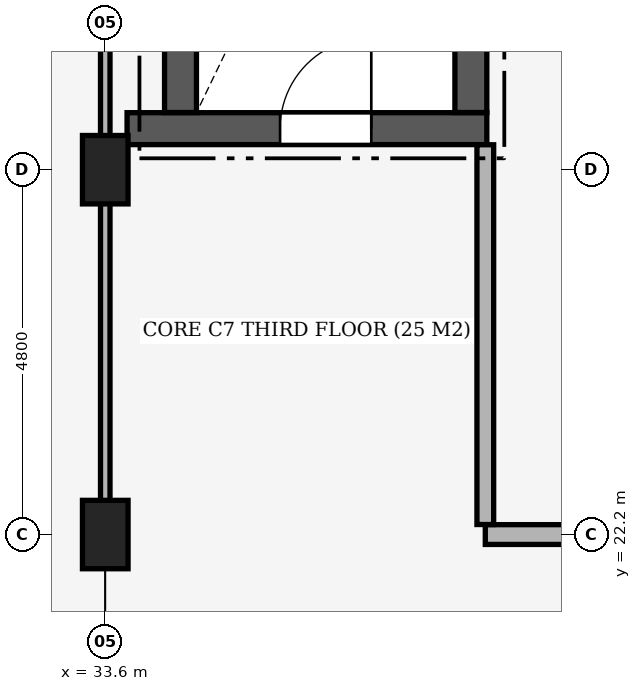
"""IFC4 building model, lengths in metres.
Left out: names, types, materials, properties, quantities, classifications, styles, units other than length and angle.
Written with IfcOpenShell. Run it as: python <this file> out.ifc"""

import sys

from ifc_helpers import new_model, si_unit, direction, frame, frame_2d, origin, origin_2d, place, context, subcontext, project, spatial, rectangle, extrude, element, fill, save


model = new_model("IFC4")
c1 = context("Model", 3, precision=1e-05, world=origin(), true_north=direction((0.0, 1.0)))
c2 = subcontext(c1, "Body", "Model", "MODEL_VIEW")
j1 = project(units=[si_unit("LENGTHUNIT", "METRE"), si_unit("PLANEANGLEUNIT", "RADIAN")], contexts=[c1])
p1 = place(None, origin())
s1 = spatial("IfcSite", under=j1, at=p1, CompositionType="ELEMENT")
p2 = place(p1, origin())
s2 = spatial("IfcBuilding", under=s1, at=p2, CompositionType="ELEMENT")
p3 = place(p2, frame((0.0, 0.0, 15.3)))
s3 = spatial("IfcBuildingStorey", under=s2, at=p3, CompositionType="ELEMENT", Elevation=15.3)
for number, where, z_axis, x_axis in (
    (1, (33.6, 22.2, 0.0), (0.0, 0.0, 1.0), (1.0, 0.0, 0.0)),
    (2, (33.6, 27.0, 0.0), (0.0, 0.0, 1.0), (1.0, 0.0, 0.0)),
):
    element("IfcColumn", number, at=place(p3, frame(where, z_axis=z_axis, x_axis=x_axis)), inside=s3, PredefinedType="COLUMN", context=c2, shape_type="SweptSolid", body=[
        extrude(rectangle(XDim=0.6, YDim=0.9, at=origin_2d()), origin(), (0.0, 0.0, 1.0), 5.1),
    ])
p4 = place(p3, frame((33.887, 27.54, 0.0), z_axis=(0.0, 0.0, 1.0), x_axis=(1.0, 0.0, 0.0)))
e3 = element("IfcWall", 3, at=p4, inside=s3, PredefinedType="SHEAR", context=c2, shape_type="SweptSolid", body=[
    extrude(rectangle(XDim=4.733, YDim=0.42, at=frame_2d((2.367, 0.0))), origin(), (0.0, 0.0, 1.0), 4.84),
])
p5 = place(p4, frame((2.013, 0.0, 0.0)))
e4 = element("IfcOpeningElement", 4, at=p5, cuts=e3, PredefinedType="OPENING", context=c2, shape_type="SweptSolid", body=[
    extrude(rectangle(XDim=1.2, YDim=2.2, at=frame_2d((0.6, 1.1))), frame((0.0, 0.225, 0.0), z_axis=(0.0, -1.0, 0.0), x_axis=(1.0, 0.0, 0.0)), (0.0, 0.0, 1.0), 0.45),
])
for number, where, z_axis, x_axis in (
    (5, (34.59, 27.752, 0.0), (0.0, 0.0, 1.0), (0.0, 1.0, 0.0)),
    (6, (38.41, 27.752, 0.0), (0.0, 0.0, 1.0), (0.0, 1.0, 0.0)),
):
    element("IfcWall", number, at=place(p3, frame(where, z_axis=z_axis, x_axis=x_axis)), inside=s3, PredefinedType="SHEAR", context=c2, shape_type="SweptSolid", body=[
        extrude(rectangle(XDim=7.046, YDim=0.42, at=frame_2d((3.523, 0.0))), origin(), (0.0, 0.0, 1.0), 4.84),
    ])
p6 = place(p3, frame((38.6, 22.2, 0.0), z_axis=(0.0, 0.0, 1.0), x_axis=(1.0, 0.0, 0.0)))
e7 = element("IfcWall", 7, at=p6, inside=s3, PredefinedType="PARTITIONING", context=c2, shape_type="SweptSolid", body=[
    extrude(rectangle(XDim=20.7, YDim=0.26, at=frame_2d((10.35, 0.0))), origin(), (0.0, 0.0, 1.0), 4.14),
])
p7 = place(p6, frame((9.325, 0.0, 0.0)))
e8 = element("IfcOpeningElement", 8, at=p7, cuts=e7, PredefinedType="OPENING", context=c2, shape_type="SweptSolid", body=[
    extrude(rectangle(XDim=1.15, YDim=2.15, at=frame_2d((0.575, 1.075))), frame((0.0, 0.145, 0.0), z_axis=(0.0, -1.0, 0.0), x_axis=(1.0, 0.0, 0.0)), (0.0, 0.0, 1.0), 0.29),
])
p8 = place(p3, frame((33.6, 22.2, 0.0), z_axis=(0.0, 0.0, 1.0), x_axis=(0.0, 1.0, 0.0)))
e9 = element("IfcWall", 9, at=p8, inside=s3, PredefinedType="PARTITIONING", context=c2, shape_type="SweptSolid", body=[
    extrude(rectangle(XDim=13.118, YDim=0.125, at=frame_2d((6.559, 0.0))), origin(), (0.0, 0.0, 1.0), 4.14),
])
p9 = place(p3, frame((38.6, 22.332, 0.0), z_axis=(0.0, 0.0, 1.0), x_axis=(0.0, 1.0, 0.0)))
e10 = element("IfcWall", 10, at=p9, inside=s3, PredefinedType="PARTITIONING", context=c2, shape_type="SweptSolid", body=[
    extrude(rectangle(XDim=4.996, YDim=0.22, at=frame_2d((2.498, 0.0))), origin(), (0.0, 0.0, 1.0), 4.14),
])
p10 = place(p5, origin())
e11 = element("IfcDoor", 11, at=p10, inside=s3, OperationType="SINGLE_SWING_RIGHT", PredefinedType="DOOR", context=c2, shape_type="SweptSolid", body=[
    extrude(rectangle(XDim=1.2, YDim=2.2, at=frame_2d((0.6, 1.1))), frame((0.0, 0.025, 0.0), z_axis=(0.0, -1.0, 0.0), x_axis=(1.0, 0.0, 0.0)), (0.0, 0.0, 1.0), 0.05),
])
fill(e4, e11)
save(model, sys.argv[1])
